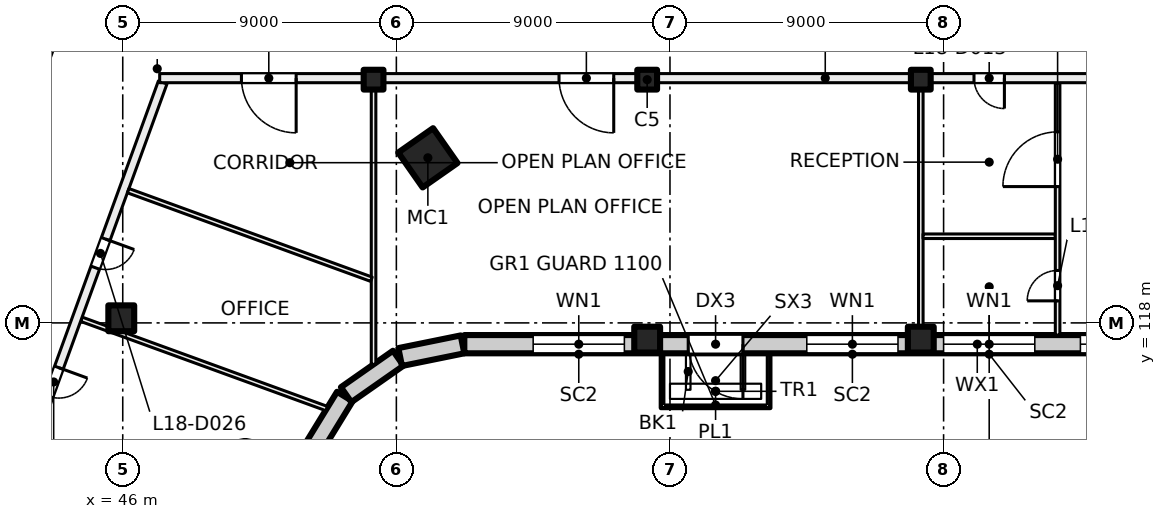
"""IFC4 building model, lengths in metres.
Left out: names, types, materials, properties, quantities, classifications, styles, units other than length and angle.
Written with IfcOpenShell. Run it as: python <this file> out.ifc"""

import sys

from ifc_helpers import new_model, si_unit, direction, frame, frame_2d, origin, origin_2d, place, context, subcontext, project, spatial, rectangle, hollow_rectangle, extrude, element, fill, save


model = new_model("IFC4")
c1 = context("Model", 3, precision=1e-05, world=origin(), true_north=direction((0.0, 1.0)))
c2 = subcontext(c1, "Body", "Model", "MODEL_VIEW")
j1 = project(units=[si_unit("LENGTHUNIT", "METRE"), si_unit("PLANEANGLEUNIT", "RADIAN")], contexts=[c1])
p1 = place(None, origin())
s1 = spatial("IfcSite", under=j1, at=p1, CompositionType="ELEMENT")
p2 = place(p1, origin())
s2 = spatial("IfcBuilding", under=s1, at=p2, CompositionType="ELEMENT")
p3 = place(p2, frame((0.0, 0.0, 81.0)))
s3 = spatial("IfcBuildingStorey", under=s2, at=p3, CompositionType="ELEMENT", Elevation=81.0)
p4 = place(p3, frame((56.036, 123.43, 0.0), z_axis=(0.0, 0.0, 1.0), x_axis=(0.573576436351, -0.819152044289, 0.0)))
e1 = element("IfcColumn", 1, at=p4, inside=s3, PredefinedType="COLUMN", context=c2, shape_type="SweptSolid", body=[
    extrude(hollow_rectangle(XDim=1.4, YDim=1.4, WallThickness=0.04, at=origin_2d()), origin(), (0.0, 0.0, 1.0), 4.0),
])
for number, where, z_axis, x_axis in (
    (2, (54.25, 126.0, 0.0), (0.0, 0.0, 1.0), (1.0, 0.0, 0.0)),
    (3, (63.25, 126.0, 0.0), (0.0, 0.0, 1.0), (1.0, 0.0, 0.0)),
    (4, (72.25, 126.0, 0.0), (0.0, 0.0, 1.0), (1.0, 0.0, 0.0)),
):
    element("IfcColumn", number, at=place(p3, frame(where, z_axis=z_axis, x_axis=x_axis)), inside=s3, PredefinedType="COLUMN", context=c2, shape_type="SweptSolid", body=[
        extrude(rectangle(XDim=0.65, YDim=0.65, at=origin_2d()), origin(), (0.0, 0.0, 1.0), 4.0),
    ])
for number, where, z_axis, x_axis in (
    (5, (45.952, 118.152, 0.0), (0.0, 0.0, 1.0), (1.0, 0.0, 0.0)),
    (6, (63.25, 117.45, 0.0), (0.0, 0.0, 1.0), (1.0, 0.0, 0.0)),
    (7, (72.25, 117.45, 0.0), (0.0, 0.0, 1.0), (1.0, 0.0, 0.0)),
):
    element("IfcColumn", number, at=place(p3, frame(where, z_axis=z_axis, x_axis=x_axis)), inside=s3, PredefinedType="COLUMN", context=c2, shape_type="SweptSolid", body=[
        extrude(rectangle(XDim=0.85, YDim=0.85, at=origin_2d()), origin(), (0.0, 0.0, 1.0), 4.0),
    ])
p5 = place(p3, frame((53.305, 115.578, 0.0), z_axis=(0.0, 0.0, 1.0), x_axis=(-0.522402266438, -0.852699168535, 0.0)))
e8 = element("IfcWall", 8, at=p5, inside=s3, PredefinedType="SOLIDWALL", context=c2, shape_type="SweptSolid", body=[
    extrude(rectangle(XDim=2.042, YDim=0.6, at=frame_2d((1.021, 0.0))), origin(), (0.0, 0.0, 1.0), 3.625),
])
for number, where, z_axis, x_axis in (
    (9, (55.062, 116.839, 0.0), (0.0, 0.0, 1.0), (-0.819, -0.574, 0.0)),
    (10, (57.175, 117.294, 0.0), (0.0, 0.0, 1.0), (-0.98, -0.199, 0.0)),
):
    element("IfcWall", number, at=place(p3, frame(where, z_axis=z_axis, x_axis=x_axis)), inside=s3, PredefinedType="SOLIDWALL", context=c2, shape_type="SweptSolid", body=[
        extrude(rectangle(XDim=2.092, YDim=0.6, at=frame_2d((1.046, 0.0))), origin(), (0.0, 0.0, 1.0), 3.625),
    ])
p6 = place(p3, frame((90.98, 117.3, 0.0), z_axis=(0.0, 0.0, 1.0), x_axis=(-1.0, 0.0, 0.0)))
e11 = element("IfcWall", 11, at=p6, inside=s3, PredefinedType="SOLIDWALL", context=c2, shape_type="SweptSolid", body=[
    extrude(rectangle(XDim=33.745, YDim=0.6, at=frame_2d((16.873, 0.0))), origin(), (0.0, 0.0, 1.0), 3.625),
])
p7 = place(p6, frame((1.48, 0.0, 0.9)))
e12 = element("IfcOpeningElement", 12, at=p7, cuts=e11, PredefinedType="OPENING", context=c2, shape_type="SweptSolid", body=[
    extrude(rectangle(XDim=3.0, YDim=2.4, at=frame_2d((1.5, 1.2))), frame((0.0, 0.31, 0.0), z_axis=(0.0, -1.0, 0.0), x_axis=(1.0, 0.0, 0.0)), (0.0, 0.0, 1.0), 0.62),
])
p8 = place(p6, frame((5.98, 0.0, 0.9)))
e13 = element("IfcOpeningElement", 13, at=p8, cuts=e11, PredefinedType="OPENING", context=c2, shape_type="SweptSolid", body=[
    extrude(rectangle(XDim=3.0, YDim=2.4, at=frame_2d((1.5, 1.2))), frame((0.0, 0.31, 0.0), z_axis=(0.0, -1.0, 0.0), x_axis=(1.0, 0.0, 0.0)), (0.0, 0.0, 1.0), 0.62),
])
p9 = place(p6, frame((10.48, 0.0, 0.9)))
e14 = element("IfcOpeningElement", 14, at=p9, cuts=e11, PredefinedType="OPENING", context=c2, shape_type="SweptSolid", body=[
    extrude(rectangle(XDim=3.0, YDim=2.4, at=frame_2d((1.5, 1.2))), frame((0.0, 0.31, 0.0), z_axis=(0.0, -1.0, 0.0), x_axis=(1.0, 0.0, 0.0)), (0.0, 0.0, 1.0), 0.62),
])
p10 = place(p6, frame((14.98, 0.0, 0.9)))
e15 = element("IfcOpeningElement", 15, at=p10, cuts=e11, PredefinedType="OPENING", context=c2, shape_type="SweptSolid", body=[
    extrude(rectangle(XDim=3.0, YDim=2.4, at=frame_2d((1.5, 1.2))), frame((0.0, 0.31, 0.0), z_axis=(0.0, -1.0, 0.0), x_axis=(1.0, 0.0, 0.0)), (0.0, 0.0, 1.0), 0.62),
])
p11 = place(p6, frame((19.48, 0.0, 0.9)))
e16 = element("IfcOpeningElement", 16, at=p11, cuts=e11, PredefinedType="OPENING", context=c2, shape_type="SweptSolid", body=[
    extrude(rectangle(XDim=3.0, YDim=2.4, at=frame_2d((1.5, 1.2))), frame((0.0, 0.31, 0.0), z_axis=(0.0, -1.0, 0.0), x_axis=(1.0, 0.0, 0.0)), (0.0, 0.0, 1.0), 0.62),
])
p12 = place(p6, frame((24.58, 0.0, 0.0)))
e17 = element("IfcOpeningElement", 17, at=p12, cuts=e11, PredefinedType="OPENING", context=c2, shape_type="SweptSolid", body=[
    extrude(rectangle(XDim=1.8, YDim=2.4, at=frame_2d((0.9, 1.2))), frame((0.0, 0.31, 0.0), z_axis=(0.0, -1.0, 0.0), x_axis=(1.0, 0.0, 0.0)), (0.0, 0.0, 1.0), 0.62),
])
p13 = place(p6, frame((28.48, 0.0, 0.9)))
e18 = element("IfcOpeningElement", 18, at=p13, cuts=e11, PredefinedType="OPENING", context=c2, shape_type="SweptSolid", body=[
    extrude(rectangle(XDim=3.0, YDim=2.4, at=frame_2d((1.5, 1.2))), frame((0.0, 0.31, 0.0), z_axis=(0.0, -1.0, 0.0), x_axis=(1.0, 0.0, 0.0)), (0.0, 0.0, 1.0), 0.62),
])
p14 = place(p3, frame((32.881, 97.657, 0.0), z_axis=(0.0, 0.0, 1.0), x_axis=(0.342017360004, 0.939693633828, 0.0)))
e19 = element("IfcWall", 19, at=p14, inside=s3, PredefinedType="PARTITIONING", context=c2, shape_type="SweptSolid", body=[
    extrude(rectangle(XDim=34.516, YDim=0.3, at=frame_2d((17.258, 0.0))), origin(), (0.0, 0.0, 1.0), 3.625),
])
p15 = place(p14, frame((2.025, 0.0, 0.0)))
e20 = element("IfcOpeningElement", 20, at=p15, cuts=e19, PredefinedType="OPENING", context=c2, shape_type="SweptSolid", body=[
    extrude(rectangle(XDim=1.2, YDim=2.1, at=frame_2d((0.6, 1.05))), frame((0.0, 0.16, 0.0), z_axis=(0.0, -1.0, 0.0), x_axis=(1.0, 0.0, 0.0)), (0.0, 0.0, 1.0), 0.32),
])
p16 = place(p14, frame((7.0, 0.0, 0.0)))
e21 = element("IfcOpeningElement", 21, at=p16, cuts=e19, PredefinedType="OPENING", context=c2, shape_type="SweptSolid", body=[
    extrude(rectangle(XDim=1.0, YDim=2.1, at=frame_2d((0.5, 1.05))), frame((0.0, 0.16, 0.0), z_axis=(0.0, -1.0, 0.0), x_axis=(1.0, 0.0, 0.0)), (0.0, 0.0, 1.0), 0.32),
])
p17 = place(p14, frame((11.5, 0.0, 0.0)))
e22 = element("IfcOpeningElement", 22, at=p17, cuts=e19, PredefinedType="OPENING", context=c2, shape_type="SweptSolid", body=[
    extrude(rectangle(XDim=1.0, YDim=2.1, at=frame_2d((0.5, 1.05))), frame((0.0, 0.16, 0.0), z_axis=(0.0, -1.0, 0.0), x_axis=(1.0, 0.0, 0.0)), (0.0, 0.0, 1.0), 0.32),
])
p18 = place(p14, frame((16.0, 0.0, 0.0)))
e23 = element("IfcOpeningElement", 23, at=p18, cuts=e19, PredefinedType="OPENING", context=c2, shape_type="SweptSolid", body=[
    extrude(rectangle(XDim=1.0, YDim=2.1, at=frame_2d((0.5, 1.05))), frame((0.0, 0.16, 0.0), z_axis=(0.0, -1.0, 0.0), x_axis=(1.0, 0.0, 0.0)), (0.0, 0.0, 1.0), 0.32),
])
p19 = place(p14, frame((20.5, 0.0, 0.0)))
e24 = element("IfcOpeningElement", 24, at=p19, cuts=e19, PredefinedType="OPENING", context=c2, shape_type="SweptSolid", body=[
    extrude(rectangle(XDim=1.0, YDim=2.1, at=frame_2d((0.5, 1.05))), frame((0.0, 0.16, 0.0), z_axis=(0.0, -1.0, 0.0), x_axis=(1.0, 0.0, 0.0)), (0.0, 0.0, 1.0), 0.32),
])
p20 = place(p14, frame((25.0, 0.0, 0.0)))
e25 = element("IfcOpeningElement", 25, at=p20, cuts=e19, PredefinedType="OPENING", context=c2, shape_type="SweptSolid", body=[
    extrude(rectangle(XDim=1.0, YDim=2.1, at=frame_2d((0.5, 1.05))), frame((0.0, 0.16, 0.0), z_axis=(0.0, -1.0, 0.0), x_axis=(1.0, 0.0, 0.0)), (0.0, 0.0, 1.0), 0.32),
])
p21 = place(p14, frame((29.779, 0.0, 0.0)))
e26 = element("IfcOpeningElement", 26, at=p21, cuts=e19, PredefinedType="OPENING", context=c2, shape_type="SweptSolid", body=[
    extrude(rectangle(XDim=1.8, YDim=2.1, at=frame_2d((0.9, 1.05))), frame((0.0, 0.16, 0.0), z_axis=(0.0, -1.0, 0.0), x_axis=(1.0, 0.0, 0.0)), (0.0, 0.0, 1.0), 0.32),
])
p22 = place(p3, frame((44.639, 118.12, 0.0), z_axis=(0.0, 0.0, 1.0), x_axis=(0.939669707102, -0.342083091593, 0.0)))
e27 = element("IfcWall", 27, at=p22, inside=s3, PredefinedType="PARTITIONING", context=c2, shape_type="SweptSolid", body=[
    extrude(rectangle(XDim=8.589, YDim=0.15, at=frame_2d((4.295, 0.0))), origin(), (0.0, 0.0, 1.0), 3.625),
])
p23 = place(p3, frame((47.314, 125.909, 0.0), z_axis=(0.0, 0.0, 1.0), x_axis=(-0.342010770371, -0.939696032209, 0.0)))
e28 = element("IfcWall", 28, at=p23, inside=s3, PredefinedType="PARTITIONING", context=c2, shape_type="SweptSolid", body=[
    extrude(rectangle(XDim=31.485, YDim=0.3, at=frame_2d((15.742, 0.0))), origin(), (0.0, 0.0, 1.0), 3.625),
])
p24 = place(p23, frame((28.259, 0.0, 0.0)))
e29 = element("IfcOpeningElement", 29, at=p24, cuts=e28, PredefinedType="OPENING", context=c2, shape_type="SweptSolid", body=[
    extrude(rectangle(XDim=1.2, YDim=2.1, at=frame_2d((0.6, 1.05))), frame((0.0, 0.16, 0.0), z_axis=(0.0, -1.0, 0.0), x_axis=(1.0, 0.0, 0.0)), (0.0, 0.0, 1.0), 0.32),
])
p25 = place(p23, frame((18.584, 0.0, 0.0)))
e30 = element("IfcOpeningElement", 30, at=p25, cuts=e28, PredefinedType="OPENING", context=c2, shape_type="SweptSolid", body=[
    extrude(rectangle(XDim=1.8, YDim=2.1, at=frame_2d((0.9, 1.05))), frame((0.0, 0.16, 0.0), z_axis=(0.0, -1.0, 0.0), x_axis=(1.0, 0.0, 0.0)), (0.0, 0.0, 1.0), 0.32),
])
p26 = place(p23, frame((9.985, 0.0, 0.0)))
e31 = element("IfcOpeningElement", 31, at=p26, cuts=e28, PredefinedType="OPENING", context=c2, shape_type="SweptSolid", body=[
    extrude(rectangle(XDim=1.0, YDim=2.1, at=frame_2d((0.5, 1.05))), frame((0.0, 0.16, 0.0), z_axis=(0.0, -1.0, 0.0), x_axis=(1.0, 0.0, 0.0)), (0.0, 0.0, 1.0), 0.32),
])
p27 = place(p23, frame((5.484, 0.0, 0.0)))
e32 = element("IfcOpeningElement", 32, at=p27, cuts=e28, PredefinedType="OPENING", context=c2, shape_type="SweptSolid", body=[
    extrude(rectangle(XDim=1.0, YDim=2.1, at=frame_2d((0.5, 1.05))), frame((0.0, 0.16, 0.0), z_axis=(0.0, -1.0, 0.0), x_axis=(1.0, 0.0, 0.0)), (0.0, 0.0, 1.0), 0.32),
])
p28 = place(p3, frame((54.25, 116.637, 0.0), z_axis=(0.0, 0.0, 1.0), x_axis=(0.0, 1.0, 0.0)))
e33 = element("IfcWall", 33, at=p28, inside=s3, PredefinedType="PARTITIONING", context=c2, shape_type="SweptSolid", body=[
    extrude(rectangle(XDim=9.263, YDim=0.15, at=frame_2d((4.631, 0.0))), origin(), (0.0, 0.0, 1.0), 3.625),
])
p29 = place(p3, frame((54.18, 119.436, 0.0), z_axis=(0.0, 0.0, 1.0), x_axis=(-0.939669476286, 0.342083725624, 0.0)))
e34 = element("IfcWall", 34, at=p29, inside=s3, PredefinedType="PARTITIONING", context=c2, shape_type="SweptSolid", body=[
    extrude(rectangle(XDim=8.516, YDim=0.15, at=frame_2d((4.258, 0.0))), origin(), (0.0, 0.0, 1.0), 3.625),
])
p30 = place(p3, frame((72.25, 117.6, 0.0), z_axis=(0.0, 0.0, 1.0), x_axis=(0.0, 1.0, 0.0)))
e35 = element("IfcWall", 35, at=p30, inside=s3, PredefinedType="PARTITIONING", context=c2, shape_type="SweptSolid", body=[
    extrude(rectangle(XDim=8.3, YDim=0.15, at=frame_2d((4.15, 0.0))), origin(), (0.0, 0.0, 1.0), 3.625),
])
p31 = place(p3, frame((72.325, 120.85, 0.0), z_axis=(0.0, 0.0, 1.0), x_axis=(1.0, 0.0, 0.0)))
e36 = element("IfcWall", 36, at=p31, inside=s3, PredefinedType="PARTITIONING", context=c2, shape_type="SweptSolid", body=[
    extrude(rectangle(XDim=4.35, YDim=0.15, at=frame_2d((2.175, 0.0))), origin(), (0.0, 0.0, 1.0), 3.625),
])
p32 = place(p3, frame((76.75, 117.6, 0.0), z_axis=(0.0, 0.0, 1.0), x_axis=(0.0, 1.0, 0.0)))
e37 = element("IfcWall", 37, at=p32, inside=s3, PredefinedType="PARTITIONING", context=c2, shape_type="SweptSolid", body=[
    extrude(rectangle(XDim=8.3, YDim=0.15, at=frame_2d((4.15, 0.0))), origin(), (0.0, 0.0, 1.0), 3.625),
])
p33 = place(p32, frame((1.125, 0.0, 0.0)))
e38 = element("IfcOpeningElement", 38, at=p33, cuts=e37, PredefinedType="OPENING", context=c2, shape_type="SweptSolid", body=[
    extrude(rectangle(XDim=1.0, YDim=2.1, at=frame_2d((0.5, 1.05))), frame((0.0, 0.085, 0.0), z_axis=(0.0, -1.0, 0.0), x_axis=(1.0, 0.0, 0.0)), (0.0, 0.0, 1.0), 0.17),
])
p34 = place(p32, frame((4.884, 0.0, 0.0)))
e39 = element("IfcOpeningElement", 39, at=p34, cuts=e37, PredefinedType="OPENING", context=c2, shape_type="SweptSolid", body=[
    extrude(rectangle(XDim=1.8, YDim=2.1, at=frame_2d((0.9, 1.05))), frame((0.0, 0.085, 0.0), z_axis=(0.0, -1.0, 0.0), x_axis=(1.0, 0.0, 0.0)), (0.0, 0.0, 1.0), 0.17),
])
p35 = place(p3, frame((91.0, 126.05, 0.0), z_axis=(0.0, 0.0, 1.0), x_axis=(-1.0, 0.0, 0.0)))
e40 = element("IfcWall", 40, at=p35, inside=s3, PredefinedType="PARTITIONING", context=c2, shape_type="SweptSolid", body=[
    extrude(rectangle(XDim=43.785, YDim=0.3, at=frame_2d((21.893, 0.0))), origin(), (0.0, 0.0, 1.0), 3.625),
])
p36 = place(p35, frame((2.025, 0.0, 0.0)))
e41 = element("IfcOpeningElement", 41, at=p36, cuts=e40, PredefinedType="OPENING", context=c2, shape_type="SweptSolid", body=[
    extrude(rectangle(XDim=1.2, YDim=2.1, at=frame_2d((0.6, 1.05))), frame((0.0, 0.16, 0.0), z_axis=(0.0, -1.0, 0.0), x_axis=(1.0, 0.0, 0.0)), (0.0, 0.0, 1.0), 0.32),
])
p37 = place(p35, frame((7.0, 0.0, 0.0)))
e42 = element("IfcOpeningElement", 42, at=p37, cuts=e40, PredefinedType="OPENING", context=c2, shape_type="SweptSolid", body=[
    extrude(rectangle(XDim=1.0, YDim=2.1, at=frame_2d((0.5, 1.05))), frame((0.0, 0.16, 0.0), z_axis=(0.0, -1.0, 0.0), x_axis=(1.0, 0.0, 0.0)), (0.0, 0.0, 1.0), 0.32),
])
p38 = place(p35, frame((16.0, 0.0, 0.0)))
e43 = element("IfcOpeningElement", 43, at=p38, cuts=e40, PredefinedType="OPENING", context=c2, shape_type="SweptSolid", body=[
    extrude(rectangle(XDim=1.0, YDim=2.1, at=frame_2d((0.5, 1.05))), frame((0.0, 0.16, 0.0), z_axis=(0.0, -1.0, 0.0), x_axis=(1.0, 0.0, 0.0)), (0.0, 0.0, 1.0), 0.32),
])
p39 = place(p35, frame((28.85, 0.0, 0.0)))
e44 = element("IfcOpeningElement", 44, at=p39, cuts=e40, PredefinedType="OPENING", context=c2, shape_type="SweptSolid", body=[
    extrude(rectangle(XDim=1.8, YDim=2.1, at=frame_2d((0.9, 1.05))), frame((0.0, 0.16, 0.0), z_axis=(0.0, -1.0, 0.0), x_axis=(1.0, 0.0, 0.0)), (0.0, 0.0, 1.0), 0.32),
])
p40 = place(p35, frame((39.296, 0.0, 0.0)))
e45 = element("IfcOpeningElement", 45, at=p40, cuts=e40, PredefinedType="OPENING", context=c2, shape_type="SweptSolid", body=[
    extrude(rectangle(XDim=1.8, YDim=2.1, at=frame_2d((0.9, 1.05))), frame((0.0, 0.16, 0.0), z_axis=(0.0, -1.0, 0.0), x_axis=(1.0, 0.0, 0.0)), (0.0, 0.0, 1.0), 0.32),
])
p41 = place(p9, origin())
e46 = element("IfcWindow", 46, at=p41, inside=s3, PartitioningType="SINGLE_PANEL", PredefinedType="WINDOW", context=c2, shape_type="SweptSolid", body=[
    extrude(rectangle(XDim=3.0, YDim=2.4, at=frame_2d((1.5, 1.2))), frame((0.0, 0.03, 0.0), z_axis=(0.0, -1.0, 0.0), x_axis=(1.0, 0.0, 0.0)), (0.0, 0.0, 1.0), 0.06),
])
fill(e14, e46)
p42 = place(p10, origin())
e47 = element("IfcWindow", 47, at=p42, inside=s3, PartitioningType="SINGLE_PANEL", PredefinedType="WINDOW", context=c2, shape_type="SweptSolid", body=[
    extrude(rectangle(XDim=3.0, YDim=2.4, at=frame_2d((1.5, 1.2))), frame((0.0, 0.03, 0.0), z_axis=(0.0, -1.0, 0.0), x_axis=(1.0, 0.0, 0.0)), (0.0, 0.0, 1.0), 0.06),
])
fill(e15, e47)
p43 = place(p11, origin())
e48 = element("IfcWindow", 48, at=p43, inside=s3, PartitioningType="SINGLE_PANEL", PredefinedType="WINDOW", context=c2, shape_type="SweptSolid", body=[
    extrude(rectangle(XDim=3.0, YDim=2.4, at=frame_2d((1.5, 1.2))), frame((0.0, 0.03, 0.0), z_axis=(0.0, -1.0, 0.0), x_axis=(1.0, 0.0, 0.0)), (0.0, 0.0, 1.0), 0.06),
])
fill(e16, e48)
p44 = place(p12, origin())
e49 = element("IfcDoor", 49, at=p44, inside=s3, OperationType="DOUBLE_DOOR_SINGLE_SWING", PredefinedType="DOOR", context=c2, shape_type="SweptSolid", body=[
    extrude(rectangle(XDim=1.8, YDim=2.4, at=frame_2d((0.9, 1.2))), frame((0.0, 0.025, 0.0), z_axis=(0.0, -1.0, 0.0), x_axis=(1.0, 0.0, 0.0)), (0.0, 0.0, 1.0), 0.05),
])
fill(e17, e49)
p45 = place(p13, origin())
e50 = element("IfcWindow", 50, at=p45, inside=s3, PartitioningType="SINGLE_PANEL", PredefinedType="WINDOW", context=c2, shape_type="SweptSolid", body=[
    extrude(rectangle(XDim=3.0, YDim=2.4, at=frame_2d((1.5, 1.2))), frame((0.0, 0.03, 0.0), z_axis=(0.0, -1.0, 0.0), x_axis=(1.0, 0.0, 0.0)), (0.0, 0.0, 1.0), 0.06),
])
fill(e18, e50)
p46 = place(p38, origin())
e51 = element("IfcDoor", 51, at=p46, inside=s3, OperationType="SINGLE_SWING_LEFT", PredefinedType="DOOR", context=c2, shape_type="SweptSolid", body=[
    extrude(rectangle(XDim=1.0, YDim=2.1, at=frame_2d((0.5, 1.05))), frame((0.0, 0.025, 0.0), z_axis=(0.0, -1.0, 0.0), x_axis=(1.0, 0.0, 0.0)), (0.0, 0.0, 1.0), 0.05),
])
fill(e43, e51)
p47 = place(p33, origin())
e52 = element("IfcDoor", 52, at=p47, inside=s3, OperationType="SINGLE_SWING_RIGHT", PredefinedType="DOOR", context=c2, shape_type="SweptSolid", body=[
    extrude(rectangle(XDim=1.0, YDim=2.1, at=frame_2d((0.5, 1.05))), frame((0.0, 0.025, 0.0), z_axis=(0.0, -1.0, 0.0), x_axis=(1.0, 0.0, 0.0)), (0.0, 0.0, 1.0), 0.05),
])
fill(e38, e52)
p48 = place(p34, origin())
e53 = element("IfcDoor", 53, at=p48, inside=s3, OperationType="DOUBLE_DOOR_SINGLE_SWING", PredefinedType="DOOR", context=c2, shape_type="SweptSolid", body=[
    extrude(rectangle(XDim=1.8, YDim=2.1, at=frame_2d((0.9, 1.05))), frame((0.0, 0.025, 0.0), z_axis=(0.0, -1.0, 0.0), x_axis=(1.0, 0.0, 0.0)), (0.0, 0.0, 1.0), 0.05),
])
fill(e39, e53)
p49 = place(p39, origin())
e54 = element("IfcDoor", 54, at=p49, inside=s3, OperationType="DOUBLE_DOOR_SINGLE_SWING", PredefinedType="DOOR", context=c2, shape_type="SweptSolid", body=[
    extrude(rectangle(XDim=1.8, YDim=2.1, at=frame_2d((0.9, 1.05))), frame((0.0, 0.025, 0.0), z_axis=(0.0, -1.0, 0.0), x_axis=(1.0, 0.0, 0.0)), (0.0, 0.0, 1.0), 0.05),
])
fill(e44, e54)
p50 = place(p26, origin())
e55 = element("IfcDoor", 55, at=p50, inside=s3, OperationType="SINGLE_SWING_LEFT", PredefinedType="DOOR", context=c2, shape_type="SweptSolid", body=[
    extrude(rectangle(XDim=1.0, YDim=2.1, at=frame_2d((0.5, 1.05))), frame((0.0, 0.025, 0.0), z_axis=(0.0, -1.0, 0.0), x_axis=(1.0, 0.0, 0.0)), (0.0, 0.0, 1.0), 0.05),
])
fill(e31, e55)
p51 = place(p27, origin())
e56 = element("IfcDoor", 56, at=p51, inside=s3, OperationType="SINGLE_SWING_LEFT", PredefinedType="DOOR", context=c2, shape_type="SweptSolid", body=[
    extrude(rectangle(XDim=1.0, YDim=2.1, at=frame_2d((0.5, 1.05))), frame((0.0, 0.025, 0.0), z_axis=(0.0, -1.0, 0.0), x_axis=(1.0, 0.0, 0.0)), (0.0, 0.0, 1.0), 0.05),
])
fill(e32, e56)
p52 = place(p21, origin())
e57 = element("IfcDoor", 57, at=p52, inside=s3, OperationType="DOUBLE_DOOR_SINGLE_SWING", PredefinedType="DOOR", context=c2, shape_type="SweptSolid", body=[
    extrude(rectangle(XDim=1.8, YDim=2.1, at=frame_2d((0.9, 1.05))), frame((0.0, 0.025, 0.0), z_axis=(0.0, -1.0, 0.0), x_axis=(1.0, 0.0, 0.0)), (0.0, 0.0, 1.0), 0.05),
])
fill(e26, e57)
p53 = place(p40, origin())
e58 = element("IfcDoor", 58, at=p53, inside=s3, OperationType="DOUBLE_DOOR_SINGLE_SWING", PredefinedType="DOOR", context=c2, shape_type="SweptSolid", body=[
    extrude(rectangle(XDim=1.8, YDim=2.1, at=frame_2d((0.9, 1.05))), frame((0.0, 0.025, 0.0), z_axis=(0.0, -1.0, 0.0), x_axis=(1.0, 0.0, 0.0)), (0.0, 0.0, 1.0), 0.05),
])
fill(e45, e58)
save(model, sys.argv[1])
